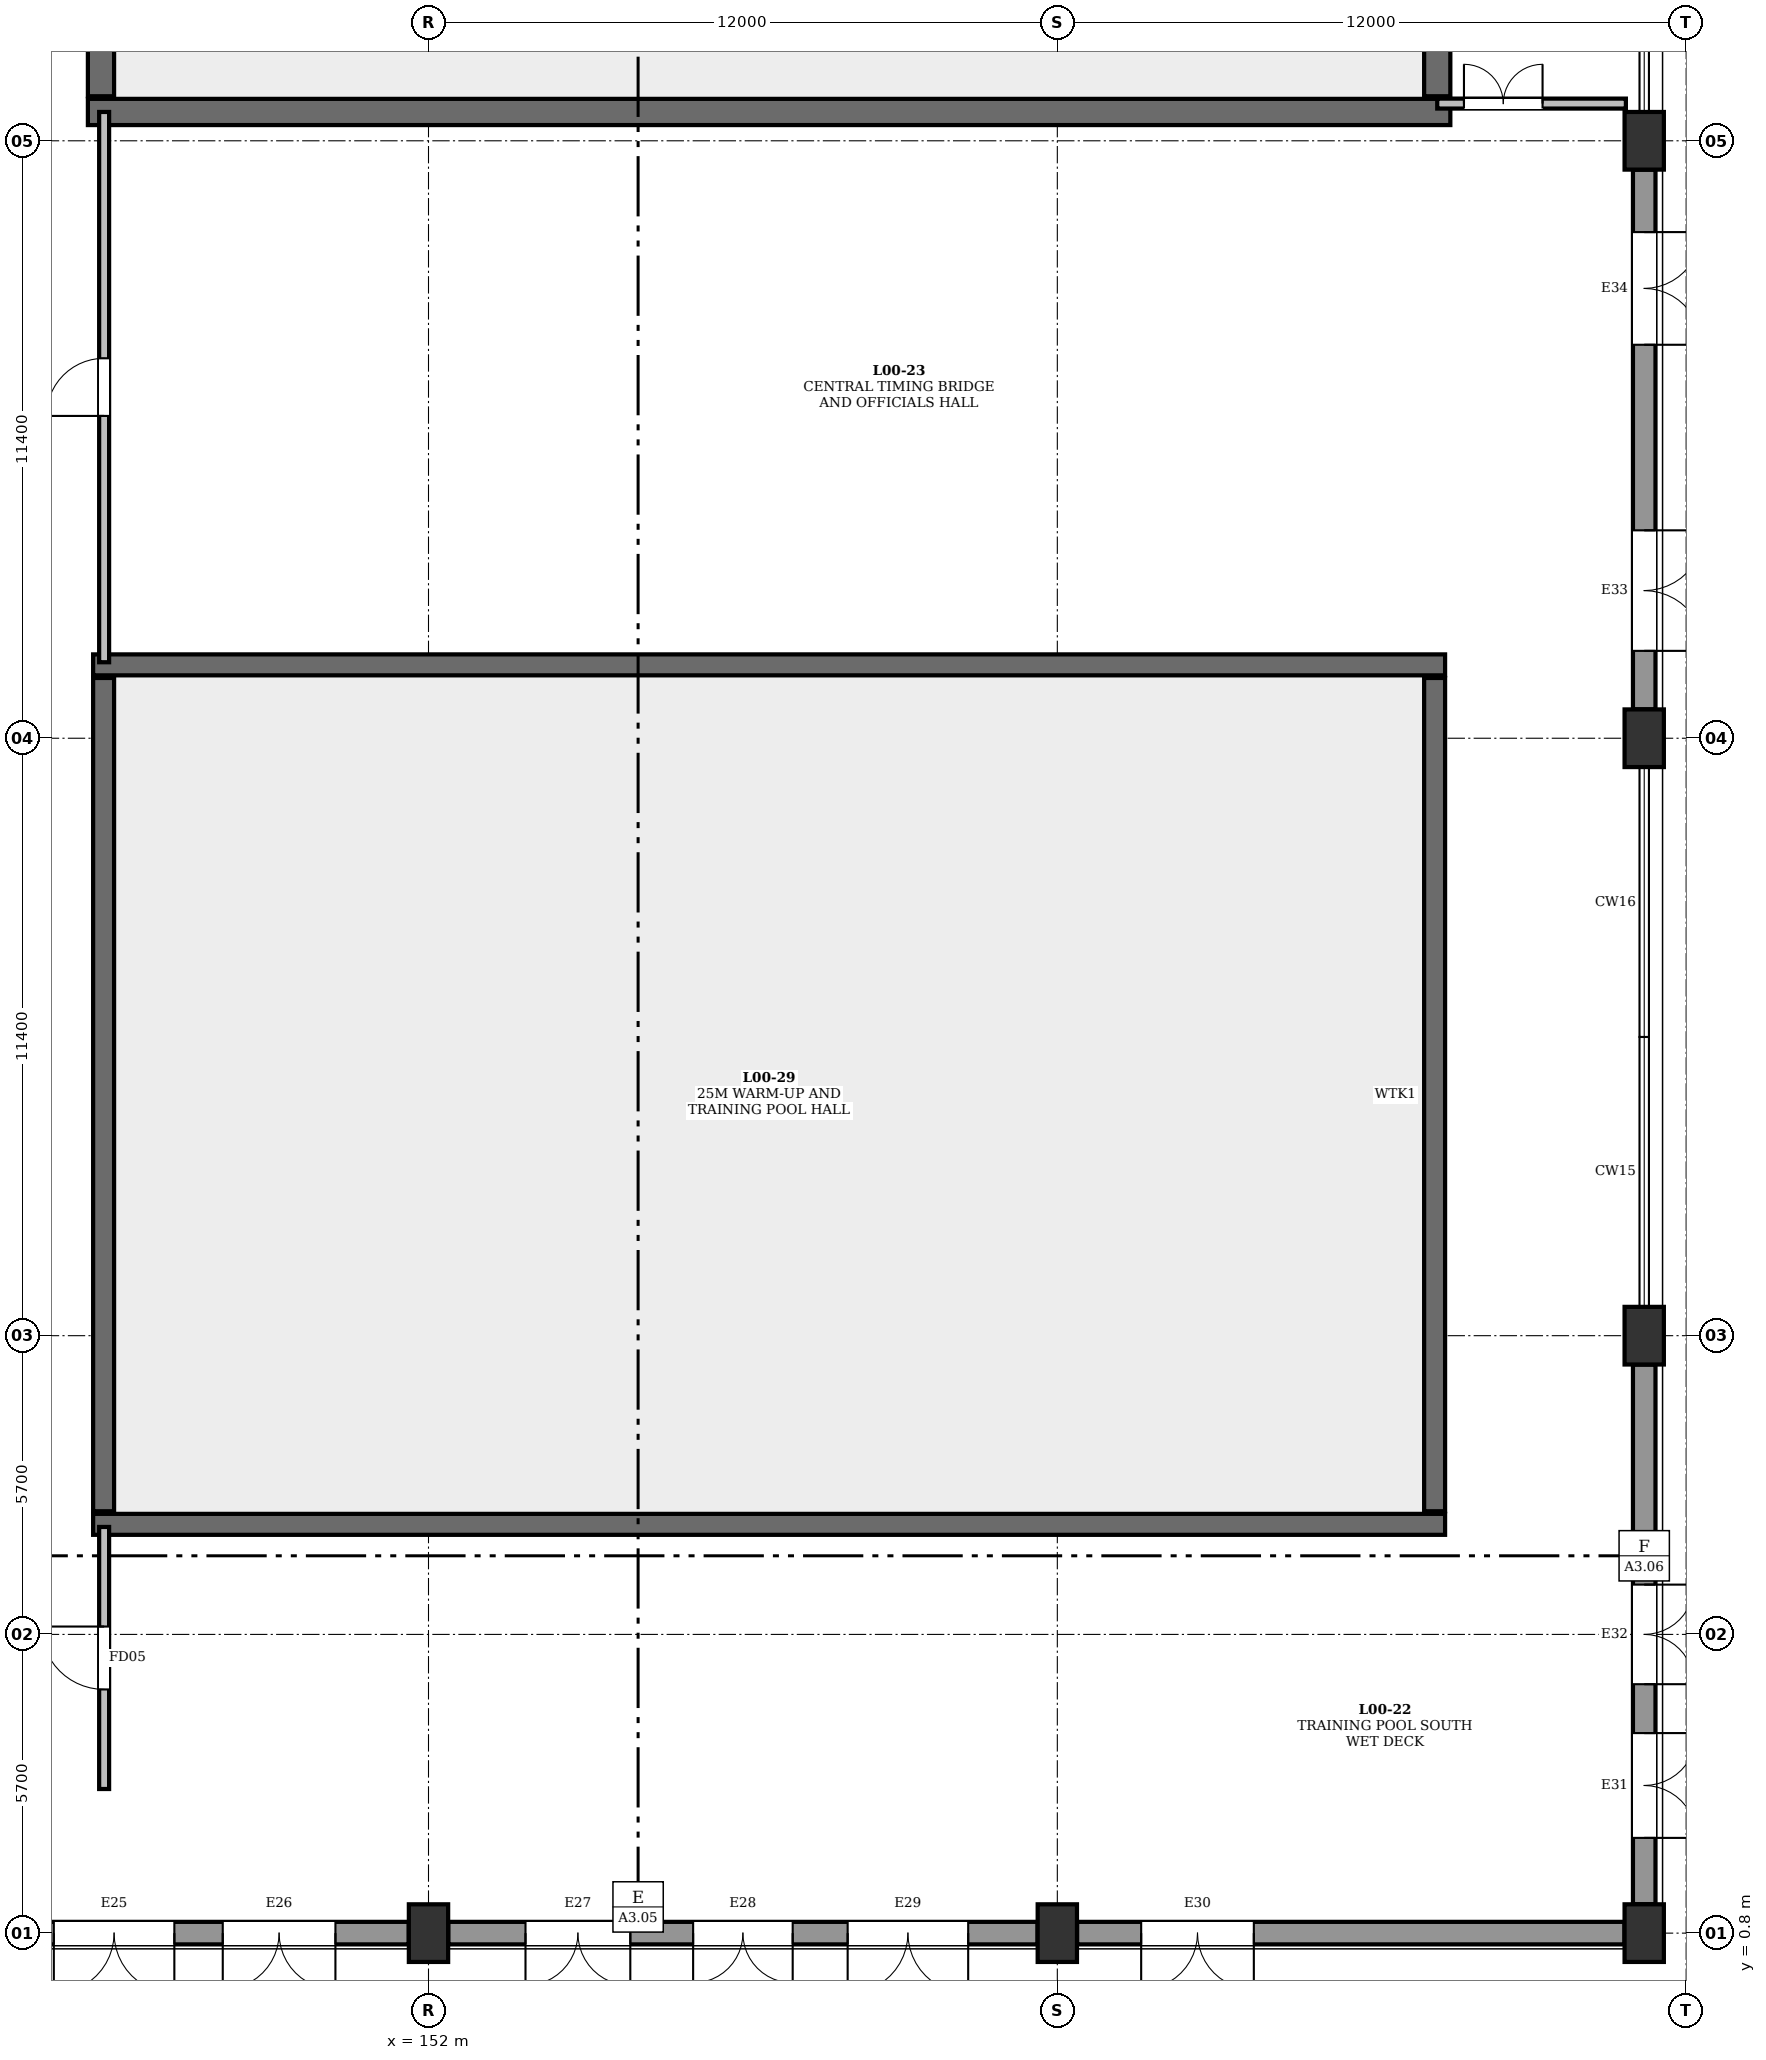
"""IFC4 building model, lengths in metres.
Left out: names, types, materials, properties, quantities, classifications, styles, units other than length and angle.
Written with IfcOpenShell. Run it as: python <this file> out.ifc"""

import sys

from ifc_helpers import new_model, si_unit, direction, frame, frame_2d, origin, origin_2d, place, context, subcontext, project, spatial, rectangle, extrude, element, fill, save


model = new_model("IFC4")
c1 = context("Model", 3, precision=1e-05, world=origin(), true_north=direction((0.0, 1.0)))
c2 = subcontext(c1, "Body", "Model", "MODEL_VIEW")
j1 = project(units=[si_unit("LENGTHUNIT", "METRE"), si_unit("PLANEANGLEUNIT", "RADIAN")], contexts=[c1])
p1 = place(None, origin())
s1 = spatial("IfcSite", under=j1, at=p1, CompositionType="ELEMENT")
p2 = place(p1, origin())
s2 = spatial("IfcBuilding", under=s1, at=p2, CompositionType="ELEMENT")
p3 = place(p2, origin())
s3 = spatial("IfcBuildingStorey", under=s2, at=p3, CompositionType="ELEMENT", Elevation=0.0)
for number, where, z_axis, x_axis in (
    (1, (152.0, 0.8, 0.0), (0.0, 0.0, 1.0), (1.0, 0.0, 0.0)),
    (2, (164.0, 0.8, 0.0), (0.0, 0.0, 1.0), (1.0, 0.0, 0.0)),
    (3, (175.2, 0.8, 0.0), (0.0, 0.0, 1.0), (1.0, 0.0, 0.0)),
    (4, (175.2, 12.2, 0.0), (0.0, 0.0, 1.0), (1.0, 0.0, 0.0)),
    (5, (175.2, 23.6, 0.0), (0.0, 0.0, 1.0), (1.0, 0.0, 0.0)),
    (6, (175.2, 35.0, 0.0), (0.0, 0.0, 1.0), (1.0, 0.0, 0.0)),
):
    element("IfcColumn", number, at=place(p3, frame(where, z_axis=z_axis, x_axis=x_axis)), inside=s3, PredefinedType="COLUMN", context=c2, shape_type="SweptSolid", body=[
        extrude(rectangle(XDim=0.75, YDim=1.1, at=origin_2d()), origin(), (0.0, 0.0, 1.0), 5.4),
    ])
p4 = place(p3, frame((145.5, 35.55, -2.5), z_axis=(0.0, 0.0, 1.0), x_axis=(1.0, 0.0, 0.0)))
e7 = element("IfcWall", 7, at=p4, inside=s3, PredefinedType="SHEAR", context=c2, shape_type="SweptSolid", body=[
    extrude(rectangle(XDim=26.0, YDim=0.5, at=frame_2d((13.0, 0.0))), origin(), (0.0, 0.0, 1.0), 2.22),
])
for number, where, z_axis, x_axis in (
    (8, (145.75, 35.85, -2.5), (0.0, 0.0, 1.0), (0.0, 1.0, 0.0)),
    (9, (171.25, 35.85, -2.5), (0.0, 0.0, 1.0), (0.0, 1.0, 0.0)),
):
    element("IfcWall", number, at=place(p3, frame(where, z_axis=z_axis, x_axis=x_axis)), inside=s3, PredefinedType="SHEAR", context=c2, shape_type="SweptSolid", body=[
        extrude(rectangle(XDim=49.9, YDim=0.5, at=frame_2d((24.95, 0.0))), origin(), (0.0, 0.0, 1.0), 2.22),
    ])
for number, where, z_axis, x_axis in (
    (10, (145.6, 8.6, -1.8), (0.0, 0.0, 1.0), (1.0, 0.0, 0.0)),
    (11, (145.6, 25.0, -1.8), (0.0, 0.0, 1.0), (1.0, 0.0, 0.0)),
):
    element("IfcWall", number, at=place(p3, frame(where, z_axis=z_axis, x_axis=x_axis)), inside=s3, PredefinedType="SHEAR", context=c2, shape_type="SweptSolid", body=[
        extrude(rectangle(XDim=25.8, YDim=0.4, at=frame_2d((12.9, 0.0))), origin(), (0.0, 0.0, 1.0), 1.52),
    ])
for number, where, z_axis, x_axis in (
    (12, (145.8, 8.85, -1.8), (0.0, 0.0, 1.0), (0.0, 1.0, 0.0)),
    (13, (171.2, 8.85, -1.8), (0.0, 0.0, 1.0), (0.0, 1.0, 0.0)),
):
    element("IfcWall", number, at=place(p3, frame(where, z_axis=z_axis, x_axis=x_axis)), inside=s3, PredefinedType="SHEAR", context=c2, shape_type="SweptSolid", body=[
        extrude(rectangle(XDim=15.9, YDim=0.4, at=frame_2d((7.95, 0.0))), origin(), (0.0, 0.0, 1.0), 1.52),
    ])
p5 = place(p3, frame((140.377, 0.8, 0.0), z_axis=(0.0, 0.0, 1.0), x_axis=(1.0, 0.0, 0.0)))
e14 = element("IfcWall", 14, at=p5, inside=s3, PredefinedType="STANDARD", context=c2, shape_type="SweptSolid", body=[
    extrude(rectangle(XDim=11.246, YDim=0.43, at=frame_2d((5.623, 0.0))), origin(), (0.0, 0.0, 1.0), 5.1),
])
p6 = place(p5, frame((1.524, 0.0, 0.0)))
e15 = element("IfcOpeningElement", 15, at=p6, cuts=e14, PredefinedType="OPENING", context=c2, shape_type="SweptSolid", body=[
    extrude(rectangle(XDim=1.9, YDim=2.3, at=frame_2d((0.95, 1.15))), frame((0.0, 0.227, 0.0), z_axis=(0.0, -1.0, 0.0), x_axis=(1.0, 0.0, 0.0)), (0.0, 0.0, 1.0), 0.454),
])
p7 = place(p5, frame((4.473, 0.0, 0.0)))
e16 = element("IfcOpeningElement", 16, at=p7, cuts=e14, PredefinedType="OPENING", context=c2, shape_type="SweptSolid", body=[
    extrude(rectangle(XDim=2.3, YDim=2.4, at=frame_2d((1.15, 1.2))), frame((0.0, 0.227, 0.0), z_axis=(0.0, -1.0, 0.0), x_axis=(1.0, 0.0, 0.0)), (0.0, 0.0, 1.0), 0.454),
])
p8 = place(p5, frame((7.697, 0.0, 0.0)))
e17 = element("IfcOpeningElement", 17, at=p8, cuts=e14, PredefinedType="OPENING", context=c2, shape_type="SweptSolid", body=[
    extrude(rectangle(XDim=2.15, YDim=2.4, at=frame_2d((1.075, 1.2))), frame((0.0, 0.227, 0.0), z_axis=(0.0, -1.0, 0.0), x_axis=(1.0, 0.0, 0.0)), (0.0, 0.0, 1.0), 0.454),
])
p9 = place(p3, frame((152.377, 0.8, 0.0), z_axis=(0.0, 0.0, 1.0), x_axis=(1.0, 0.0, 0.0)))
e18 = element("IfcWall", 18, at=p9, inside=s3, PredefinedType="STANDARD", context=c2, shape_type="SweptSolid", body=[
    extrude(rectangle(XDim=11.246, YDim=0.43, at=frame_2d((5.623, 0.0))), origin(), (0.0, 0.0, 1.0), 5.1),
])
p10 = place(p9, frame((1.474, 0.0, 0.0)))
e19 = element("IfcOpeningElement", 19, at=p10, cuts=e18, PredefinedType="OPENING", context=c2, shape_type="SweptSolid", body=[
    extrude(rectangle(XDim=2.0, YDim=2.35, at=frame_2d((1.0, 1.175))), frame((0.0, 0.227, 0.0), z_axis=(0.0, -1.0, 0.0), x_axis=(1.0, 0.0, 0.0)), (0.0, 0.0, 1.0), 0.454),
])
p11 = place(p9, frame((4.673, 0.0, 0.0)))
e20 = element("IfcOpeningElement", 20, at=p11, cuts=e18, PredefinedType="OPENING", context=c2, shape_type="SweptSolid", body=[
    extrude(rectangle(XDim=1.9, YDim=2.3, at=frame_2d((0.95, 1.15))), frame((0.0, 0.227, 0.0), z_axis=(0.0, -1.0, 0.0), x_axis=(1.0, 0.0, 0.0)), (0.0, 0.0, 1.0), 0.454),
])
p12 = place(p9, frame((7.622, 0.0, 0.0)))
e21 = element("IfcOpeningElement", 21, at=p12, cuts=e18, PredefinedType="OPENING", context=c2, shape_type="SweptSolid", body=[
    extrude(rectangle(XDim=2.3, YDim=2.4, at=frame_2d((1.15, 1.2))), frame((0.0, 0.227, 0.0), z_axis=(0.0, -1.0, 0.0), x_axis=(1.0, 0.0, 0.0)), (0.0, 0.0, 1.0), 0.454),
])
p13 = place(p3, frame((164.377, 0.8, 0.0), z_axis=(0.0, 0.0, 1.0), x_axis=(1.0, 0.0, 0.0)))
e22 = element("IfcWall", 22, at=p13, inside=s3, PredefinedType="STANDARD", context=c2, shape_type="SweptSolid", body=[
    extrude(rectangle(XDim=10.446, YDim=0.43, at=frame_2d((5.223, 0.0))), origin(), (0.0, 0.0, 1.0), 5.1),
])
p14 = place(p13, frame((1.223, 0.0, 0.0)))
e23 = element("IfcOpeningElement", 23, at=p14, cuts=e22, PredefinedType="OPENING", context=c2, shape_type="SweptSolid", body=[
    extrude(rectangle(XDim=2.15, YDim=2.4, at=frame_2d((1.075, 1.2))), frame((0.0, 0.227, 0.0), z_axis=(0.0, -1.0, 0.0), x_axis=(1.0, 0.0, 0.0)), (0.0, 0.0, 1.0), 0.454),
])
p15 = place(p3, frame((175.2, 1.352, 0.0), z_axis=(0.0, 0.0, 1.0), x_axis=(0.0, 1.0, 0.0)))
e24 = element("IfcWall", 24, at=p15, inside=s3, PredefinedType="STANDARD", context=c2, shape_type="SweptSolid", body=[
    extrude(rectangle(XDim=10.296, YDim=0.43, at=frame_2d((5.148, 0.0))), origin(), (0.0, 0.0, 1.0), 3.51),
])
p16 = place(p15, frame((1.265, 0.0, 0.0)))
e25 = element("IfcOpeningElement", 25, at=p16, cuts=e24, PredefinedType="OPENING", context=c2, shape_type="SweptSolid", body=[
    extrude(rectangle(XDim=2.0, YDim=2.35, at=frame_2d((1.0, 1.175))), frame((0.0, 0.227, 0.0), z_axis=(0.0, -1.0, 0.0), x_axis=(1.0, 0.0, 0.0)), (0.0, 0.0, 1.0), 0.454),
])
p17 = place(p15, frame((4.198, 0.0, 0.0)))
e26 = element("IfcOpeningElement", 26, at=p17, cuts=e24, PredefinedType="OPENING", context=c2, shape_type="SweptSolid", body=[
    extrude(rectangle(XDim=1.9, YDim=2.3, at=frame_2d((0.95, 1.15))), frame((0.0, 0.227, 0.0), z_axis=(0.0, -1.0, 0.0), x_axis=(1.0, 0.0, 0.0)), (0.0, 0.0, 1.0), 0.454),
])
p18 = place(p3, frame((175.2, 24.152, 0.0), z_axis=(0.0, 0.0, 1.0), x_axis=(0.0, 1.0, 0.0)))
e27 = element("IfcWall", 27, at=p18, inside=s3, PredefinedType="STANDARD", context=c2, shape_type="SweptSolid", body=[
    extrude(rectangle(XDim=10.296, YDim=0.43, at=frame_2d((5.148, 0.0))), origin(), (0.0, 0.0, 1.0), 5.1),
])
p19 = place(p18, frame((1.115, 0.0, 0.0)))
e28 = element("IfcOpeningElement", 28, at=p19, cuts=e27, PredefinedType="OPENING", context=c2, shape_type="SweptSolid", body=[
    extrude(rectangle(XDim=2.3, YDim=2.4, at=frame_2d((1.15, 1.2))), frame((0.0, 0.227, 0.0), z_axis=(0.0, -1.0, 0.0), x_axis=(1.0, 0.0, 0.0)), (0.0, 0.0, 1.0), 0.454),
])
p20 = place(p18, frame((6.956, 0.0, 0.0)))
e29 = element("IfcOpeningElement", 29, at=p20, cuts=e27, PredefinedType="OPENING", context=c2, shape_type="SweptSolid", body=[
    extrude(rectangle(XDim=2.15, YDim=2.4, at=frame_2d((1.075, 1.2))), frame((0.0, 0.227, 0.0), z_axis=(0.0, -1.0, 0.0), x_axis=(1.0, 0.0, 0.0)), (0.0, 0.0, 1.0), 0.454),
])
p21 = place(p3, frame((145.81, 3.55, 0.0), z_axis=(0.0, 0.0, 1.0), x_axis=(0.0, 1.0, 0.0)))
e30 = element("IfcWall", 30, at=p21, inside=s3, PredefinedType="SOLIDWALL", context=c2, shape_type="SweptSolid", body=[
    extrude(rectangle(XDim=5.0, YDim=0.19, at=frame_2d((2.5, 0.0))), origin(), (0.0, 0.0, 1.0), 5.16),
])
p22 = place(p21, frame((1.9, 0.0, 0.0)))
e31 = element("IfcOpeningElement", 31, at=p22, cuts=e30, PredefinedType="OPENING", context=c2, shape_type="SweptSolid", body=[
    extrude(rectangle(XDim=1.2, YDim=2.2, at=frame_2d((0.6, 1.1))), frame((0.0, 0.107, 0.0), z_axis=(0.0, -1.0, 0.0), x_axis=(1.0, 0.0, 0.0)), (0.0, 0.0, 1.0), 0.214),
])
p23 = place(p3, frame((145.81, 25.05, 0.0), z_axis=(0.0, 0.0, 1.0), x_axis=(0.0, 1.0, 0.0)))
e32 = element("IfcWall", 32, at=p23, inside=s3, PredefinedType="SOLIDWALL", context=c2, shape_type="SweptSolid", body=[
    extrude(rectangle(XDim=10.5, YDim=0.19, at=frame_2d((5.25, 0.0))), origin(), (0.0, 0.0, 1.0), 5.16),
])
p24 = place(p23, frame((4.7, 0.0, 0.0)))
e33 = element("IfcOpeningElement", 33, at=p24, cuts=e32, PredefinedType="OPENING", context=c2, shape_type="SweptSolid", body=[
    extrude(rectangle(XDim=1.1, YDim=2.2, at=frame_2d((0.55, 1.1))), frame((0.0, 0.107, 0.0), z_axis=(0.0, -1.0, 0.0), x_axis=(1.0, 0.0, 0.0)), (0.0, 0.0, 1.0), 0.214),
])
p25 = place(p3, frame((171.25, 35.71, 0.0), z_axis=(0.0, 0.0, 1.0), x_axis=(1.0, 0.0, 0.0)))
e34 = element("IfcWall", 34, at=p25, inside=s3, PredefinedType="SOLIDWALL", context=c2, shape_type="SweptSolid", body=[
    extrude(rectangle(XDim=3.6, YDim=0.19, at=frame_2d((1.8, 0.0))), origin(), (0.0, 0.0, 1.0), 3.51),
])
p26 = place(p25, frame((0.51, 0.0, 0.0)))
e35 = element("IfcOpeningElement", 35, at=p26, cuts=e34, PredefinedType="OPENING", context=c2, shape_type="SweptSolid", body=[
    extrude(rectangle(XDim=1.5, YDim=2.2, at=frame_2d((0.75, 1.1))), frame((0.0, 0.107, 0.0), z_axis=(0.0, -1.0, 0.0), x_axis=(1.0, 0.0, 0.0)), (0.0, 0.0, 1.0), 0.214),
])
p27 = place(p7, frame((2.3, 0.0, 0.0), z_axis=(0.0, 0.0, 1.0), x_axis=(-1.0, 0.0, 0.0)))
e36 = element("IfcDoor", 36, at=p27, inside=s3, OperationType="DOUBLE_DOOR_SINGLE_SWING", PredefinedType="DOOR", context=c2, shape_type="SweptSolid", body=[
    extrude(rectangle(XDim=2.3, YDim=2.4, at=frame_2d((1.15, 1.2))), frame((0.0, 0.025, 0.0), z_axis=(0.0, -1.0, 0.0), x_axis=(1.0, 0.0, 0.0)), (0.0, 0.0, 1.0), 0.05),
])
fill(e16, e36)
p28 = place(p8, frame((2.15, 0.0, 0.0), z_axis=(0.0, 0.0, 1.0), x_axis=(-1.0, 0.0, 0.0)))
e37 = element("IfcDoor", 37, at=p28, inside=s3, OperationType="DOUBLE_DOOR_SINGLE_SWING", PredefinedType="DOOR", context=c2, shape_type="SweptSolid", body=[
    extrude(rectangle(XDim=2.15, YDim=2.4, at=frame_2d((1.075, 1.2))), frame((0.0, 0.025, 0.0), z_axis=(0.0, -1.0, 0.0), x_axis=(1.0, 0.0, 0.0)), (0.0, 0.0, 1.0), 0.05),
])
fill(e17, e37)
p29 = place(p10, frame((2.0, 0.0, 0.0), z_axis=(0.0, 0.0, 1.0), x_axis=(-1.0, 0.0, 0.0)))
e38 = element("IfcDoor", 38, at=p29, inside=s3, OperationType="DOUBLE_DOOR_SINGLE_SWING", PredefinedType="DOOR", context=c2, shape_type="SweptSolid", body=[
    extrude(rectangle(XDim=2.0, YDim=2.35, at=frame_2d((1.0, 1.175))), frame((0.0, 0.025, 0.0), z_axis=(0.0, -1.0, 0.0), x_axis=(1.0, 0.0, 0.0)), (0.0, 0.0, 1.0), 0.05),
])
fill(e19, e38)
p30 = place(p11, frame((1.9, 0.0, 0.0), z_axis=(0.0, 0.0, 1.0), x_axis=(-1.0, 0.0, 0.0)))
e39 = element("IfcDoor", 39, at=p30, inside=s3, OperationType="DOUBLE_DOOR_SINGLE_SWING", PredefinedType="DOOR", context=c2, shape_type="SweptSolid", body=[
    extrude(rectangle(XDim=1.9, YDim=2.3, at=frame_2d((0.95, 1.15))), frame((0.0, 0.025, 0.0), z_axis=(0.0, -1.0, 0.0), x_axis=(1.0, 0.0, 0.0)), (0.0, 0.0, 1.0), 0.05),
])
fill(e20, e39)
p31 = place(p12, frame((2.3, 0.0, 0.0), z_axis=(0.0, 0.0, 1.0), x_axis=(-1.0, 0.0, 0.0)))
e40 = element("IfcDoor", 40, at=p31, inside=s3, OperationType="DOUBLE_DOOR_SINGLE_SWING", PredefinedType="DOOR", context=c2, shape_type="SweptSolid", body=[
    extrude(rectangle(XDim=2.3, YDim=2.4, at=frame_2d((1.15, 1.2))), frame((0.0, 0.025, 0.0), z_axis=(0.0, -1.0, 0.0), x_axis=(1.0, 0.0, 0.0)), (0.0, 0.0, 1.0), 0.05),
])
fill(e21, e40)
p32 = place(p14, frame((2.15, 0.0, 0.0), z_axis=(0.0, 0.0, 1.0), x_axis=(-1.0, 0.0, 0.0)))
e41 = element("IfcDoor", 41, at=p32, inside=s3, OperationType="DOUBLE_DOOR_SINGLE_SWING", PredefinedType="DOOR", context=c2, shape_type="SweptSolid", body=[
    extrude(rectangle(XDim=2.15, YDim=2.4, at=frame_2d((1.075, 1.2))), frame((0.0, 0.025, 0.0), z_axis=(0.0, -1.0, 0.0), x_axis=(1.0, 0.0, 0.0)), (0.0, 0.0, 1.0), 0.05),
])
fill(e23, e41)
p33 = place(p16, frame((2.0, 0.0, 0.0), z_axis=(0.0, 0.0, 1.0), x_axis=(-1.0, 0.0, 0.0)))
e42 = element("IfcDoor", 42, at=p33, inside=s3, OperationType="DOUBLE_DOOR_SINGLE_SWING", PredefinedType="DOOR", context=c2, shape_type="SweptSolid", body=[
    extrude(rectangle(XDim=2.0, YDim=2.35, at=frame_2d((1.0, 1.175))), frame((0.0, 0.025, 0.0), z_axis=(0.0, -1.0, 0.0), x_axis=(1.0, 0.0, 0.0)), (0.0, 0.0, 1.0), 0.05),
])
fill(e25, e42)
p34 = place(p17, frame((1.9, 0.0, 0.0), z_axis=(0.0, 0.0, 1.0), x_axis=(-1.0, 0.0, 0.0)))
e43 = element("IfcDoor", 43, at=p34, inside=s3, OperationType="DOUBLE_DOOR_SINGLE_SWING", PredefinedType="DOOR", context=c2, shape_type="SweptSolid", body=[
    extrude(rectangle(XDim=1.9, YDim=2.3, at=frame_2d((0.95, 1.15))), frame((0.0, 0.025, 0.0), z_axis=(0.0, -1.0, 0.0), x_axis=(1.0, 0.0, 0.0)), (0.0, 0.0, 1.0), 0.05),
])
fill(e26, e43)
p35 = place(p19, frame((2.3, 0.0, 0.0), z_axis=(0.0, 0.0, 1.0), x_axis=(-1.0, 0.0, 0.0)))
e44 = element("IfcDoor", 44, at=p35, inside=s3, OperationType="DOUBLE_DOOR_SINGLE_SWING", PredefinedType="DOOR", context=c2, shape_type="SweptSolid", body=[
    extrude(rectangle(XDim=2.3, YDim=2.4, at=frame_2d((1.15, 1.2))), frame((0.0, 0.025, 0.0), z_axis=(0.0, -1.0, 0.0), x_axis=(1.0, 0.0, 0.0)), (0.0, 0.0, 1.0), 0.05),
])
fill(e28, e44)
p36 = place(p20, frame((2.15, 0.0, 0.0), z_axis=(0.0, 0.0, 1.0), x_axis=(-1.0, 0.0, 0.0)))
e45 = element("IfcDoor", 45, at=p36, inside=s3, OperationType="DOUBLE_DOOR_SINGLE_SWING", PredefinedType="DOOR", context=c2, shape_type="SweptSolid", body=[
    extrude(rectangle(XDim=2.15, YDim=2.4, at=frame_2d((1.075, 1.2))), frame((0.0, 0.025, 0.0), z_axis=(0.0, -1.0, 0.0), x_axis=(1.0, 0.0, 0.0)), (0.0, 0.0, 1.0), 0.05),
])
fill(e29, e45)
p37 = place(p22, origin())
e46 = element("IfcDoor", 46, at=p37, inside=s3, OperationType="SINGLE_SWING_RIGHT", PredefinedType="DOOR", context=c2, shape_type="SweptSolid", body=[
    extrude(rectangle(XDim=1.2, YDim=2.2, at=frame_2d((0.6, 1.1))), frame((0.0, 0.025, 0.0), z_axis=(0.0, -1.0, 0.0), x_axis=(1.0, 0.0, 0.0)), (0.0, 0.0, 1.0), 0.05),
])
fill(e31, e46)
p38 = place(p24, origin())
e47 = element("IfcDoor", 47, at=p38, inside=s3, OperationType="SINGLE_SWING_LEFT", PredefinedType="DOOR", context=c2, shape_type="SweptSolid", body=[
    extrude(rectangle(XDim=1.1, YDim=2.2, at=frame_2d((0.55, 1.1))), frame((0.0, 0.025, 0.0), z_axis=(0.0, -1.0, 0.0), x_axis=(1.0, 0.0, 0.0)), (0.0, 0.0, 1.0), 0.05),
])
fill(e33, e47)
p39 = place(p26, origin())
e48 = element("IfcDoor", 48, at=p39, inside=s3, OperationType="DOUBLE_DOOR_SINGLE_SWING", PredefinedType="DOOR", context=c2, shape_type="SweptSolid", body=[
    extrude(rectangle(XDim=1.5, YDim=2.2, at=frame_2d((0.75, 1.1))), frame((0.0, 0.025, 0.0), z_axis=(0.0, -1.0, 0.0), x_axis=(1.0, 0.0, 0.0)), (0.0, 0.0, 1.0), 0.05),
])
fill(e35, e48)
save(model, sys.argv[1])
